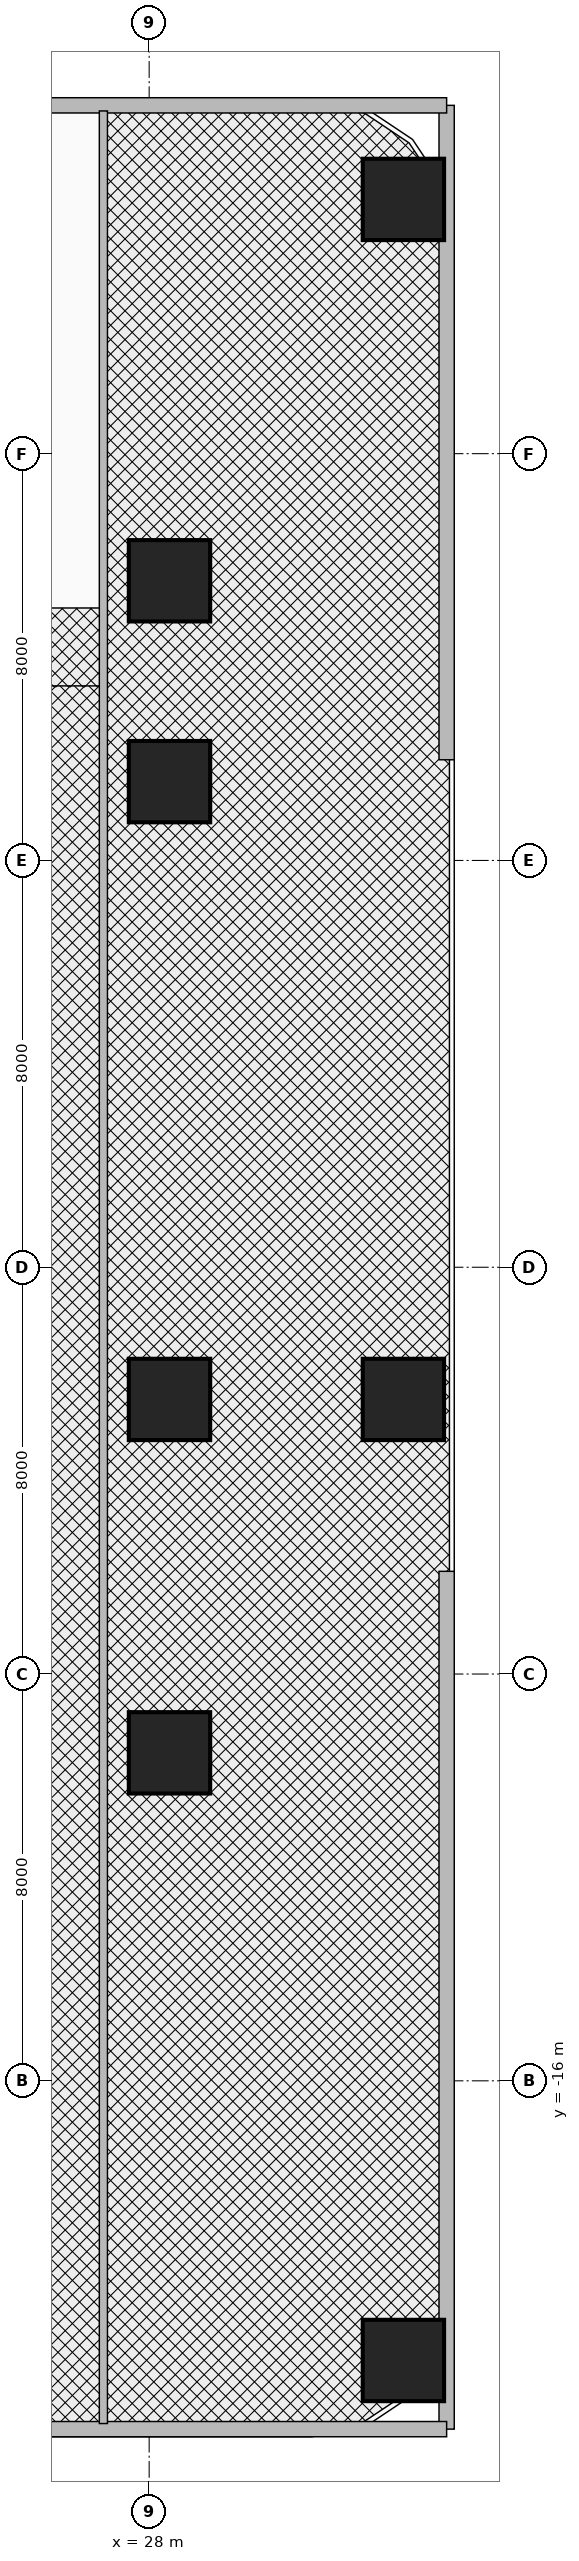
"""IFC4 building model, lengths in metres.
Left out: names, types, materials, properties, quantities, classifications, styles, units other than length and angle.
Written with IfcOpenShell. Run it as: python <this file> out.ifc"""

import sys

from ifc_helpers import new_model, si_unit, direction, frame, frame_2d, origin, origin_2d, place, context, subcontext, project, spatial, rectangle, extrude, source, transform, mapped, element, fill, save


model = new_model("IFC4")
c1 = context("Model", 3, precision=1e-05, world=origin(), true_north=direction((0.0, 1.0)))
c2 = subcontext(c1, "Body", "Model", "MODEL_VIEW")
j1 = project(units=[si_unit("LENGTHUNIT", "METRE"), si_unit("PLANEANGLEUNIT", "RADIAN")], contexts=[c1])
p1 = place(None, origin())
s1 = spatial("IfcSite", under=j1, at=p1, CompositionType="ELEMENT")
p2 = place(p1, origin())
s2 = spatial("IfcBuilding", under=s1, at=p2, CompositionType="ELEMENT")
p3 = place(p2, frame((0.0, 0.0, 5.2)))
s3 = spatial("IfcBuildingStorey", under=s2, at=p3, CompositionType="ELEMENT", Elevation=5.2)
m1 = source(origin(), c2, "Body", "SweptSolid", [
    extrude(rectangle(XDim=1.6, YDim=1.6, at=origin_2d()), origin(), (0.0, 0.0, 1.0), 5.2),
])
for number, where, z_axis, x_axis in (
    (1, (28.4, -9.55, 0.0), (0.0, 0.0, 1.0), (1.0, 0.0, 0.0)),
    (2, (28.4, -2.6, 0.0), (0.0, 0.0, 1.0), (1.0, 0.0, 0.0)),
    (3, (28.4, 9.55, 0.0), (0.0, 0.0, 1.0), (1.0, 0.0, 0.0)),
    (4, (28.4, 13.5, 0.0), (0.0, 0.0, 1.0), (1.0, 0.0, 0.0)),
    (5, (33.0, 21.0, 0.0), (0.0, 0.0, 1.0), (1.0, 0.0, 0.0)),
    (6, (33.0, -2.6, 0.0), (0.0, 0.0, 1.0), (1.0, 0.0, 0.0)),
    (7, (33.0, -21.5, 0.0), (0.0, 0.0, 1.0), (1.0, 0.0, 0.0)),
):
    element("IfcColumn", number, at=place(p3, frame(where, z_axis=z_axis, x_axis=x_axis)), inside=s3, PredefinedType="COLUMN", context=c2, shape_type="MappedRepresentation", body=[
        mapped(m1, transform((0.0, 0.0, 0.0), x_axis=(1.0, 0.0, 0.0), y_axis=(0.0, 1.0, 0.0), z_axis=(0.0, 0.0, 1.0), scale=1.0)),
    ])
p4 = place(p3, frame((33.85, -22.85, 0.0), z_axis=(0.0, 0.0, 1.0), x_axis=(0.0, 1.0, 0.0)))
e8 = element("IfcWall", 8, at=p4, inside=s3, PredefinedType="SOLIDWALL", context=c2, shape_type="SweptSolid", body=[
    extrude(rectangle(XDim=16.87, YDim=0.3, at=frame_2d((8.435, 0.0))), origin(), (0.0, 0.0, 1.0), 4.92),
])
p5 = place(p4, frame((3.0, 0.0, 0.9)))
e9 = element("IfcOpeningElement", 9, at=p5, cuts=e8, PredefinedType="OPENING", context=c2, shape_type="SweptSolid", body=[
    extrude(rectangle(XDim=1.5, YDim=1.75, at=frame_2d((0.75, 0.875))), frame((0.0, 0.165, 0.0), z_axis=(0.0, -1.0, 0.0), x_axis=(1.0, 0.0, 0.0)), (0.0, 0.0, 1.0), 0.33),
])
p6 = place(p4, frame((8.2, 0.0, 0.9)))
e10 = element("IfcOpeningElement", 10, at=p6, cuts=e8, PredefinedType="OPENING", context=c2, shape_type="SweptSolid", body=[
    extrude(rectangle(XDim=1.5, YDim=1.75, at=frame_2d((0.75, 0.875))), frame((0.0, 0.165, 0.0), z_axis=(0.0, -1.0, 0.0), x_axis=(1.0, 0.0, 0.0)), (0.0, 0.0, 1.0), 0.33),
])
p7 = place(p4, frame((13.4, 0.0, 0.9)))
e11 = element("IfcOpeningElement", 11, at=p7, cuts=e8, PredefinedType="OPENING", context=c2, shape_type="SweptSolid", body=[
    extrude(rectangle(XDim=1.5, YDim=1.75, at=frame_2d((0.75, 0.875))), frame((0.0, 0.165, 0.0), z_axis=(0.0, -1.0, 0.0), x_axis=(1.0, 0.0, 0.0)), (0.0, 0.0, 1.0), 0.33),
])
p8 = place(p3, frame((33.85, 9.98, 0.0), z_axis=(0.0, 0.0, 1.0), x_axis=(0.0, 1.0, 0.0)))
e12 = element("IfcWall", 12, at=p8, inside=s3, PredefinedType="SOLIDWALL", context=c2, shape_type="SweptSolid", body=[
    extrude(rectangle(XDim=12.87, YDim=0.3, at=frame_2d((6.435, 0.0))), origin(), (0.0, 0.0, 1.0), 4.92),
])
p9 = place(p8, frame((3.0, 0.0, 0.9)))
e13 = element("IfcOpeningElement", 13, at=p9, cuts=e12, PredefinedType="OPENING", context=c2, shape_type="SweptSolid", body=[
    extrude(rectangle(XDim=1.5, YDim=1.75, at=frame_2d((0.75, 0.875))), frame((0.0, 0.165, 0.0), z_axis=(0.0, -1.0, 0.0), x_axis=(1.0, 0.0, 0.0)), (0.0, 0.0, 1.0), 0.33),
])
p10 = place(p8, frame((8.2, 0.0, 0.9)))
e14 = element("IfcOpeningElement", 14, at=p10, cuts=e12, PredefinedType="OPENING", context=c2, shape_type="SweptSolid", body=[
    extrude(rectangle(XDim=1.5, YDim=1.75, at=frame_2d((0.75, 0.875))), frame((0.0, 0.165, 0.0), z_axis=(0.0, -1.0, 0.0), x_axis=(1.0, 0.0, 0.0)), (0.0, 0.0, 1.0), 0.33),
])
p11 = place(p3, frame((12.15, -22.85, 0.0), z_axis=(0.0, 0.0, 1.0), x_axis=(1.0, 0.0, 0.0)))
e15 = element("IfcWall", 15, at=p11, inside=s3, PredefinedType="SOLIDWALL", context=c2, shape_type="SweptSolid", body=[
    extrude(rectangle(XDim=21.7, YDim=0.3, at=frame_2d((10.85, 0.0))), origin(), (0.0, 0.0, 1.0), 4.92),
])
p12 = place(p11, frame((3.2, 0.0, 0.9)))
e16 = element("IfcOpeningElement", 16, at=p12, cuts=e15, PredefinedType="OPENING", context=c2, shape_type="SweptSolid", body=[
    extrude(rectangle(XDim=1.5, YDim=1.75, at=frame_2d((0.75, 0.875))), frame((0.0, 0.165, 0.0), z_axis=(0.0, -1.0, 0.0), x_axis=(1.0, 0.0, 0.0)), (0.0, 0.0, 1.0), 0.33),
])
p13 = place(p11, frame((9.8, 0.0, 0.9)))
e17 = element("IfcOpeningElement", 17, at=p13, cuts=e15, PredefinedType="OPENING", context=c2, shape_type="SweptSolid", body=[
    extrude(rectangle(XDim=1.5, YDim=1.75, at=frame_2d((0.75, 0.875))), frame((0.0, 0.165, 0.0), z_axis=(0.0, -1.0, 0.0), x_axis=(1.0, 0.0, 0.0)), (0.0, 0.0, 1.0), 0.33),
])
p14 = place(p11, frame((17.6, 0.0, 0.9)))
e18 = element("IfcOpeningElement", 18, at=p14, cuts=e15, PredefinedType="OPENING", context=c2, shape_type="SweptSolid", body=[
    extrude(rectangle(XDim=1.5, YDim=1.75, at=frame_2d((0.75, 0.875))), frame((0.0, 0.165, 0.0), z_axis=(0.0, -1.0, 0.0), x_axis=(1.0, 0.0, 0.0)), (0.0, 0.0, 1.0), 0.33),
])
p15 = place(p3, frame((9.98, 22.85, 0.0), z_axis=(0.0, 0.0, 1.0), x_axis=(1.0, 0.0, 0.0)))
e19 = element("IfcWall", 19, at=p15, inside=s3, PredefinedType="SOLIDWALL", context=c2, shape_type="SweptSolid", body=[
    extrude(rectangle(XDim=23.87, YDim=0.3, at=frame_2d((11.935, 0.0))), origin(), (0.0, 0.0, 1.0), 4.92),
])
p16 = place(p15, frame((3.2, 0.0, 0.9)))
e20 = element("IfcOpeningElement", 20, at=p16, cuts=e19, PredefinedType="OPENING", context=c2, shape_type="SweptSolid", body=[
    extrude(rectangle(XDim=1.5, YDim=1.75, at=frame_2d((0.75, 0.875))), frame((0.0, 0.165, 0.0), z_axis=(0.0, -1.0, 0.0), x_axis=(1.0, 0.0, 0.0)), (0.0, 0.0, 1.0), 0.33),
])
p17 = place(p15, frame((10.0, 0.0, 0.9)))
e21 = element("IfcOpeningElement", 21, at=p17, cuts=e19, PredefinedType="OPENING", context=c2, shape_type="SweptSolid", body=[
    extrude(rectangle(XDim=1.5, YDim=1.75, at=frame_2d((0.75, 0.875))), frame((0.0, 0.165, 0.0), z_axis=(0.0, -1.0, 0.0), x_axis=(1.0, 0.0, 0.0)), (0.0, 0.0, 1.0), 0.33),
])
p18 = place(p15, frame((17.8, 0.0, 0.9)))
e22 = element("IfcOpeningElement", 22, at=p18, cuts=e19, PredefinedType="OPENING", context=c2, shape_type="SweptSolid", body=[
    extrude(rectangle(XDim=1.5, YDim=1.75, at=frame_2d((0.75, 0.875))), frame((0.0, 0.165, 0.0), z_axis=(0.0, -1.0, 0.0), x_axis=(1.0, 0.0, 0.0)), (0.0, 0.0, 1.0), 0.33),
])
p19 = place(p3, frame((27.1, -22.74, 0.0), z_axis=(0.0, 0.0, 1.0), x_axis=(0.0, 1.0, 0.0)))
e23 = element("IfcWall", 23, at=p19, inside=s3, PredefinedType="PARTITIONING", context=c2, shape_type="SweptSolid", body=[
    extrude(rectangle(XDim=45.48, YDim=0.16, at=frame_2d((22.74, 0.0))), origin(), (0.0, 0.0, 1.0), 3.957),
])
p20 = place(p19, frame((7.0, 0.0, 0.0)))
e24 = element("IfcOpeningElement", 24, at=p20, cuts=e23, PredefinedType="OPENING", context=c2, shape_type="SweptSolid", body=[
    extrude(rectangle(XDim=1.8, YDim=2.15, at=frame_2d((0.9, 1.075))), frame((0.0, 0.095, 0.0), z_axis=(0.0, -1.0, 0.0), x_axis=(1.0, 0.0, 0.0)), (0.0, 0.0, 1.0), 0.19),
])
p21 = place(p19, frame((25.0, 0.0, 0.0)))
e25 = element("IfcOpeningElement", 25, at=p21, cuts=e23, PredefinedType="OPENING", context=c2, shape_type="SweptSolid", body=[
    extrude(rectangle(XDim=1.8, YDim=2.15, at=frame_2d((0.9, 1.075))), frame((0.0, 0.095, 0.0), z_axis=(0.0, -1.0, 0.0), x_axis=(1.0, 0.0, 0.0)), (0.0, 0.0, 1.0), 0.19),
])
p22 = place(p5, origin())
e26 = element("IfcWindow", 26, at=p22, inside=s3, PartitioningType="SINGLE_PANEL", PredefinedType="WINDOW", context=c2, shape_type="SweptSolid", body=[
    extrude(rectangle(XDim=1.5, YDim=1.75, at=frame_2d((0.75, 0.875))), frame((0.0, 0.03, 0.0), z_axis=(0.0, -1.0, 0.0), x_axis=(1.0, 0.0, 0.0)), (0.0, 0.0, 1.0), 0.06),
])
fill(e9, e26)
p23 = place(p6, origin())
e27 = element("IfcWindow", 27, at=p23, inside=s3, PartitioningType="SINGLE_PANEL", PredefinedType="WINDOW", context=c2, shape_type="SweptSolid", body=[
    extrude(rectangle(XDim=1.5, YDim=1.75, at=frame_2d((0.75, 0.875))), frame((0.0, 0.03, 0.0), z_axis=(0.0, -1.0, 0.0), x_axis=(1.0, 0.0, 0.0)), (0.0, 0.0, 1.0), 0.06),
])
fill(e10, e27)
p24 = place(p7, origin())
e28 = element("IfcWindow", 28, at=p24, inside=s3, PartitioningType="SINGLE_PANEL", PredefinedType="WINDOW", context=c2, shape_type="SweptSolid", body=[
    extrude(rectangle(XDim=1.5, YDim=1.75, at=frame_2d((0.75, 0.875))), frame((0.0, 0.03, 0.0), z_axis=(0.0, -1.0, 0.0), x_axis=(1.0, 0.0, 0.0)), (0.0, 0.0, 1.0), 0.06),
])
fill(e11, e28)
p25 = place(p9, origin())
e29 = element("IfcWindow", 29, at=p25, inside=s3, PartitioningType="SINGLE_PANEL", PredefinedType="WINDOW", context=c2, shape_type="SweptSolid", body=[
    extrude(rectangle(XDim=1.5, YDim=1.75, at=frame_2d((0.75, 0.875))), frame((0.0, 0.03, 0.0), z_axis=(0.0, -1.0, 0.0), x_axis=(1.0, 0.0, 0.0)), (0.0, 0.0, 1.0), 0.06),
])
fill(e13, e29)
p26 = place(p10, origin())
e30 = element("IfcWindow", 30, at=p26, inside=s3, PartitioningType="SINGLE_PANEL", PredefinedType="WINDOW", context=c2, shape_type="SweptSolid", body=[
    extrude(rectangle(XDim=1.5, YDim=1.75, at=frame_2d((0.75, 0.875))), frame((0.0, 0.03, 0.0), z_axis=(0.0, -1.0, 0.0), x_axis=(1.0, 0.0, 0.0)), (0.0, 0.0, 1.0), 0.06),
])
fill(e14, e30)
p27 = place(p14, origin())
e31 = element("IfcWindow", 31, at=p27, inside=s3, PartitioningType="SINGLE_PANEL", PredefinedType="WINDOW", context=c2, shape_type="SweptSolid", body=[
    extrude(rectangle(XDim=1.5, YDim=1.75, at=frame_2d((0.75, 0.875))), frame((0.0, 0.03, 0.0), z_axis=(0.0, -1.0, 0.0), x_axis=(1.0, 0.0, 0.0)), (0.0, 0.0, 1.0), 0.06),
])
fill(e18, e31)
p28 = place(p18, origin())
e32 = element("IfcWindow", 32, at=p28, inside=s3, PartitioningType="SINGLE_PANEL", PredefinedType="WINDOW", context=c2, shape_type="SweptSolid", body=[
    extrude(rectangle(XDim=1.5, YDim=1.75, at=frame_2d((0.75, 0.875))), frame((0.0, 0.03, 0.0), z_axis=(0.0, -1.0, 0.0), x_axis=(1.0, 0.0, 0.0)), (0.0, 0.0, 1.0), 0.06),
])
fill(e22, e32)
p29 = place(p20, origin())
e33 = element("IfcDoor", 33, at=p29, inside=s3, OperationType="DOUBLE_DOOR_SINGLE_SWING", PredefinedType="DOOR", context=c2, shape_type="SweptSolid", body=[
    extrude(rectangle(XDim=1.8, YDim=2.15, at=frame_2d((0.9, 1.075))), frame((0.0, 0.025, 0.0), z_axis=(0.0, -1.0, 0.0), x_axis=(1.0, 0.0, 0.0)), (0.0, 0.0, 1.0), 0.05),
])
fill(e24, e33)
p30 = place(p21, frame((1.8, 0.0, 0.0), z_axis=(0.0, 0.0, 1.0), x_axis=(-1.0, 0.0, 0.0)))
e34 = element("IfcDoor", 34, at=p30, inside=s3, OperationType="DOUBLE_DOOR_SINGLE_SWING", PredefinedType="DOOR", context=c2, shape_type="SweptSolid", body=[
    extrude(rectangle(XDim=1.8, YDim=2.15, at=frame_2d((0.9, 1.075))), frame((0.0, 0.025, 0.0), z_axis=(0.0, -1.0, 0.0), x_axis=(1.0, 0.0, 0.0)), (0.0, 0.0, 1.0), 0.05),
])
fill(e25, e34)
save(model, sys.argv[1])
